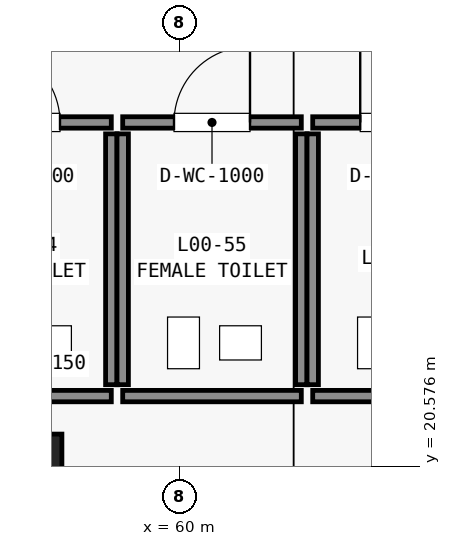
"""IFC4 building model, lengths in metres.
Left out: names, types, materials, properties, quantities, classifications, styles, units other than length and angle.
Written with IfcOpenShell. Run it as: python <this file> out.ifc"""

import sys

from ifc_helpers import new_model, si_unit, direction, frame, frame_2d, origin, origin_2d, place, context, subcontext, project, spatial, rectangle, extrude, element, fill, save


model = new_model("IFC4")
c1 = context("Model", 3, precision=1e-05, world=origin(), true_north=direction((0.0, 1.0)))
c2 = subcontext(c1, "Body", "Model", "MODEL_VIEW")
j1 = project(units=[si_unit("LENGTHUNIT", "METRE"), si_unit("PLANEANGLEUNIT", "RADIAN")], contexts=[c1])
p1 = place(None, origin())
s1 = spatial("IfcSite", under=j1, at=p1, CompositionType="ELEMENT")
p2 = place(p1, origin())
s2 = spatial("IfcBuilding", under=s1, at=p2, CompositionType="ELEMENT")
p3 = place(p2, origin())
s3 = spatial("IfcBuildingStorey", under=s2, at=p3, CompositionType="ELEMENT", Elevation=0.0)
p4 = place(p3, frame((58.0, 20.4, 0.0), z_axis=(0.0, 0.0, 1.0), x_axis=(1.0, 0.0, 0.0)))
e1 = element("IfcColumn", 1, at=p4, inside=s3, PredefinedType="PILASTER", context=c2, shape_type="SweptSolid", body=[
    extrude(rectangle(XDim=0.9, YDim=1.2, at=origin_2d()), origin(), (0.0, 0.0, 1.0), 6.0),
])
p5 = place(p3, frame((56.75, 21.5, 0.0), z_axis=(0.0, 0.0, 1.0), x_axis=(1.0, 0.0, 0.0)))
e2 = element("IfcWall", 2, at=p5, inside=s3, PredefinedType="STANDARD", context=c2, shape_type="SweptSolid", body=[
    extrude(rectangle(XDim=2.35, YDim=0.15, at=frame_2d((1.175, 0.0))), origin(), (0.0, 0.0, 1.0), 5.64),
])
p6 = place(p3, frame((56.75, 25.1, 0.0), z_axis=(0.0, 0.0, 1.0), x_axis=(1.0, 0.0, 0.0)))
e3 = element("IfcWall", 3, at=p6, inside=s3, PredefinedType="STANDARD", context=c2, shape_type="SweptSolid", body=[
    extrude(rectangle(XDim=2.35, YDim=0.15, at=frame_2d((1.175, 0.0))), origin(), (0.0, 0.0, 1.0), 5.64),
])
p7 = place(p6, frame((0.675, 0.0, 0.0)))
e4 = element("IfcOpeningElement", 4, at=p7, cuts=e3, PredefinedType="OPENING", context=c2, shape_type="SweptSolid", body=[
    extrude(rectangle(XDim=1.0, YDim=2.15, at=frame_2d((0.5, 1.075))), frame((0.0, 0.085, 0.0), z_axis=(0.0, -1.0, 0.0), x_axis=(1.0, 0.0, 0.0)), (0.0, 0.0, 1.0), 0.17),
])
p8 = place(p3, frame((59.1, 21.65, 0.0), z_axis=(0.0, 0.0, 1.0), x_axis=(0.0, 1.0, 0.0)))
e5 = element("IfcWall", 5, at=p8, inside=s3, PredefinedType="STANDARD", context=c2, shape_type="SweptSolid", body=[
    extrude(rectangle(XDim=3.3, YDim=0.15, at=frame_2d((1.65, 0.0))), origin(), (0.0, 0.0, 1.0), 5.64),
])
p9 = place(p3, frame((59.25, 21.5, 0.0), z_axis=(0.0, 0.0, 1.0), x_axis=(1.0, 0.0, 0.0)))
e6 = element("IfcWall", 6, at=p9, inside=s3, PredefinedType="STANDARD", context=c2, shape_type="SweptSolid", body=[
    extrude(rectangle(XDim=2.35, YDim=0.15, at=frame_2d((1.175, 0.0))), origin(), (0.0, 0.0, 1.0), 5.64),
])
p10 = place(p3, frame((59.25, 25.1, 0.0), z_axis=(0.0, 0.0, 1.0), x_axis=(1.0, 0.0, 0.0)))
e7 = element("IfcWall", 7, at=p10, inside=s3, PredefinedType="STANDARD", context=c2, shape_type="SweptSolid", body=[
    extrude(rectangle(XDim=2.35, YDim=0.15, at=frame_2d((1.175, 0.0))), origin(), (0.0, 0.0, 1.0), 5.64),
])
p11 = place(p10, frame((0.675, 0.0, 0.0)))
e8 = element("IfcOpeningElement", 8, at=p11, cuts=e7, PredefinedType="OPENING", context=c2, shape_type="SweptSolid", body=[
    extrude(rectangle(XDim=1.0, YDim=2.15, at=frame_2d((0.5, 1.075))), frame((0.0, 0.085, 0.0), z_axis=(0.0, -1.0, 0.0), x_axis=(1.0, 0.0, 0.0)), (0.0, 0.0, 1.0), 0.17),
])
for number, where, z_axis, x_axis in (
    (9, (59.25, 21.65, 0.0), (0.0, 0.0, 1.0), (0.0, 1.0, 0.0)),
    (10, (61.6, 21.65, 0.0), (0.0, 0.0, 1.0), (0.0, 1.0, 0.0)),
):
    element("IfcWall", number, at=place(p3, frame(where, z_axis=z_axis, x_axis=x_axis)), inside=s3, PredefinedType="STANDARD", context=c2, shape_type="SweptSolid", body=[
        extrude(rectangle(XDim=3.3, YDim=0.15, at=frame_2d((1.65, 0.0))), origin(), (0.0, 0.0, 1.0), 5.64),
    ])
p12 = place(p3, frame((61.75, 21.5, 0.0), z_axis=(0.0, 0.0, 1.0), x_axis=(1.0, 0.0, 0.0)))
e11 = element("IfcWall", 11, at=p12, inside=s3, PredefinedType="STANDARD", context=c2, shape_type="SweptSolid", body=[
    extrude(rectangle(XDim=2.2, YDim=0.15, at=frame_2d((1.1, 0.0))), origin(), (0.0, 0.0, 1.0), 5.64),
])
p13 = place(p3, frame((61.75, 25.1, 0.0), z_axis=(0.0, 0.0, 1.0), x_axis=(1.0, 0.0, 0.0)))
e12 = element("IfcWall", 12, at=p13, inside=s3, PredefinedType="STANDARD", context=c2, shape_type="SweptSolid", body=[
    extrude(rectangle(XDim=2.2, YDim=0.15, at=frame_2d((1.1, 0.0))), origin(), (0.0, 0.0, 1.0), 5.64),
])
p14 = place(p13, frame((0.625, 0.0, 0.0)))
e13 = element("IfcOpeningElement", 13, at=p14, cuts=e12, PredefinedType="OPENING", context=c2, shape_type="SweptSolid", body=[
    extrude(rectangle(XDim=0.95, YDim=2.15, at=frame_2d((0.475, 1.075))), frame((0.0, 0.085, 0.0), z_axis=(0.0, -1.0, 0.0), x_axis=(1.0, 0.0, 0.0)), (0.0, 0.0, 1.0), 0.17),
])
p15 = place(p3, frame((61.75, 21.65, 0.0), z_axis=(0.0, 0.0, 1.0), x_axis=(0.0, 1.0, 0.0)))
e14 = element("IfcWall", 14, at=p15, inside=s3, PredefinedType="STANDARD", context=c2, shape_type="SweptSolid", body=[
    extrude(rectangle(XDim=3.3, YDim=0.15, at=frame_2d((1.65, 0.0))), origin(), (0.0, 0.0, 1.0), 5.64),
])
p16 = place(p7, origin())
e15 = element("IfcDoor", 15, at=p16, inside=s3, OperationType="SINGLE_SWING_LEFT", PredefinedType="DOOR", context=c2, shape_type="SweptSolid", body=[
    extrude(rectangle(XDim=1.0, YDim=2.15, at=frame_2d((0.5, 1.075))), frame((0.0, 0.025, 0.0), z_axis=(0.0, -1.0, 0.0), x_axis=(1.0, 0.0, 0.0)), (0.0, 0.0, 1.0), 0.05),
])
fill(e4, e15)
p17 = place(p11, origin())
e16 = element("IfcDoor", 16, at=p17, inside=s3, OperationType="SINGLE_SWING_RIGHT", PredefinedType="DOOR", context=c2, shape_type="SweptSolid", body=[
    extrude(rectangle(XDim=1.0, YDim=2.15, at=frame_2d((0.5, 1.075))), frame((0.0, 0.025, 0.0), z_axis=(0.0, -1.0, 0.0), x_axis=(1.0, 0.0, 0.0)), (0.0, 0.0, 1.0), 0.05),
])
fill(e8, e16)
p18 = place(p14, origin())
e17 = element("IfcDoor", 17, at=p18, inside=s3, OperationType="SINGLE_SWING_LEFT", PredefinedType="DOOR", context=c2, shape_type="SweptSolid", body=[
    extrude(rectangle(XDim=0.95, YDim=2.15, at=frame_2d((0.475, 1.075))), frame((0.0, 0.025, 0.0), z_axis=(0.0, -1.0, 0.0), x_axis=(1.0, 0.0, 0.0)), (0.0, 0.0, 1.0), 0.05),
])
fill(e13, e17)
save(model, sys.argv[1])
